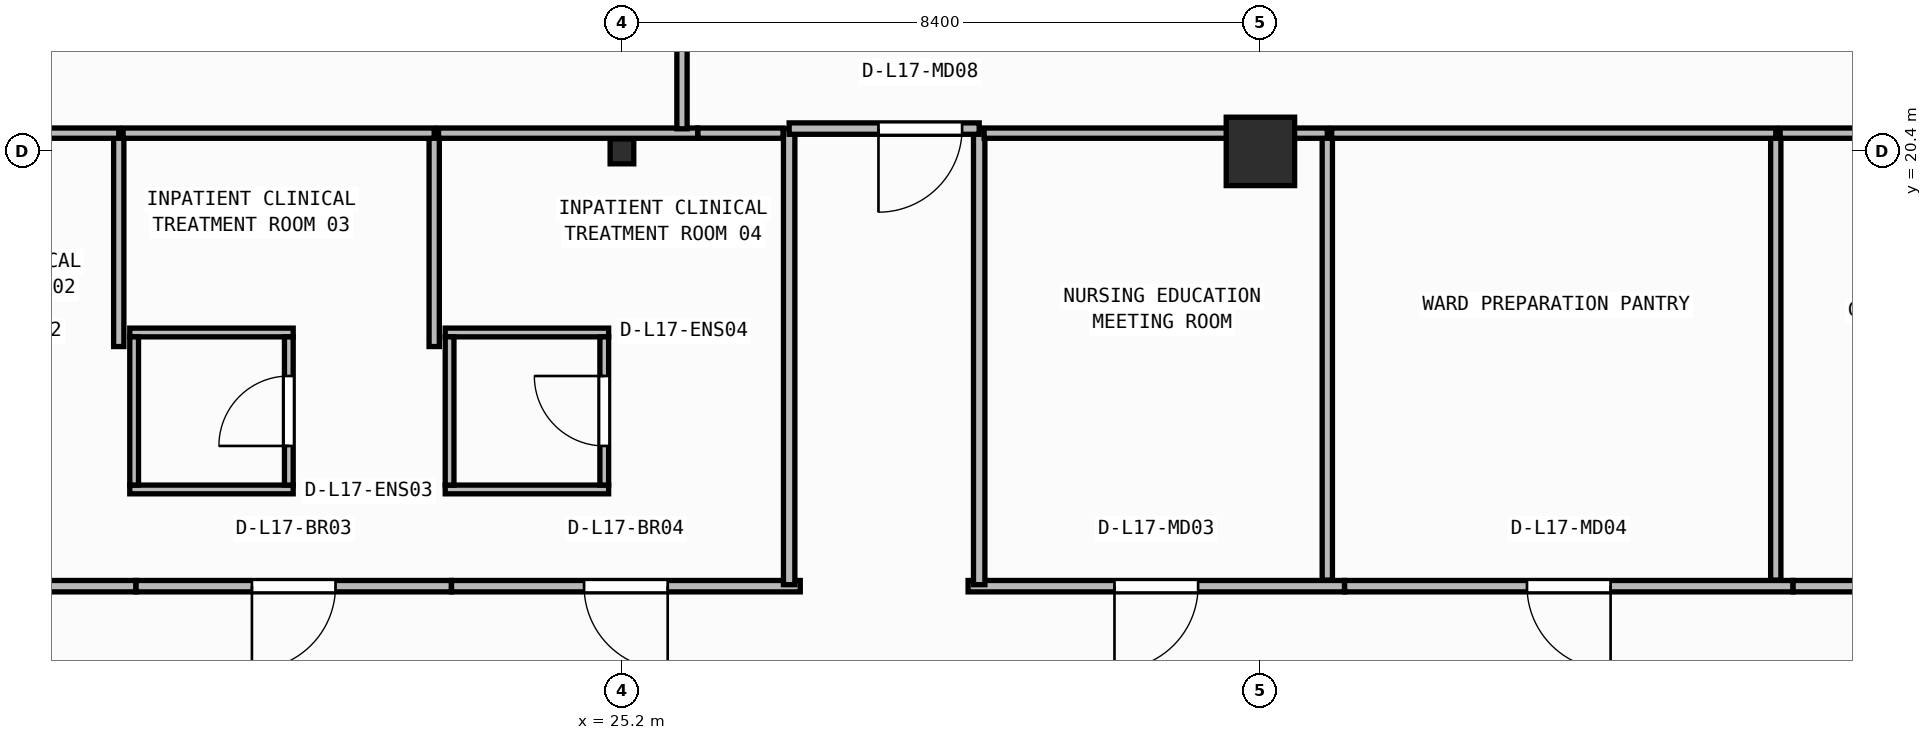
"""IFC4 building model, lengths in metres.
Left out: names, types, materials, properties, quantities, classifications, styles, units other than length and angle.
Written with IfcOpenShell. Run it as: python <this file> out.ifc"""

import sys

from ifc_helpers import new_model, si_unit, direction, frame, frame_2d, origin, origin_2d, place, context, subcontext, project, spatial, rectangle, i_section, extrude, element, fill, save


model = new_model("IFC4")
c1 = context("Model", 3, precision=1e-05, world=origin(), true_north=direction((0.0, 1.0)))
c2 = subcontext(c1, "Body", "Model", "MODEL_VIEW")
j1 = project(units=[si_unit("LENGTHUNIT", "METRE"), si_unit("PLANEANGLEUNIT", "RADIAN")], contexts=[c1])
p1 = place(None, origin())
s1 = spatial("IfcSite", under=j1, at=p1, CompositionType="ELEMENT")
p2 = place(p1, origin())
s2 = spatial("IfcBuilding", under=s1, at=p2, CompositionType="ELEMENT")
p3 = place(p2, frame((0.0, 0.0, 69.9)))
s3 = spatial("IfcBuildingStorey", under=s2, at=p3, CompositionType="ELEMENT", Elevation=69.9)
p4 = place(p3, frame((25.2, 20.4, 0.0), z_axis=(0.0, 0.0, 1.0), x_axis=(1.0, 0.0, 0.0)))
e1 = element("IfcColumn", 1, at=p4, inside=s3, PredefinedType="COLUMN", context=c2, shape_type="SweptSolid", body=[
    extrude(i_section(OverallWidth=0.311, OverallDepth=0.327, WebThickness=0.016, FlangeThickness=0.025, FilletRadius=0.017, at=origin_2d()), origin(), (0.0, 0.0, 1.0), 3.95),
])
p5 = place(p3, frame((33.6, 20.4, 0.0), z_axis=(0.0, 0.0, 1.0), x_axis=(1.0, 0.0, 0.0)))
e2 = element("IfcColumn", 2, at=p5, inside=s3, PredefinedType="COLUMN", context=c2, shape_type="SweptSolid", body=[
    extrude(rectangle(XDim=0.9, YDim=0.9, at=origin_2d()), origin(), (0.0, 0.0, 1.0), 3.95),
])
for number, where, z_axis, x_axis in (
    (3, (18.725, 15.952, 0.0), (0.0, 0.0, 1.0), (1.0, 0.0, 0.0)),
    (4, (18.725, 18.018, 0.0), (0.0, 0.0, 1.0), (1.0, 0.0, 0.0)),
):
    element("IfcWall", number, at=place(p3, frame(where, z_axis=z_axis, x_axis=x_axis)), inside=s3, PredefinedType="PARTITIONING", context=c2, shape_type="SweptSolid", body=[
        extrude(rectangle(XDim=2.15, YDim=0.115, at=frame_2d((1.075, 0.0))), origin(), (0.0, 0.0, 1.0), 3.71),
    ])
p6 = place(p3, frame((18.782, 16.01, 0.0), z_axis=(0.0, 0.0, 1.0), x_axis=(0.0, 1.0, 0.0)))
e5 = element("IfcWall", 5, at=p6, inside=s3, PredefinedType="PARTITIONING", context=c2, shape_type="SweptSolid", body=[
    extrude(rectangle(XDim=1.95, YDim=0.115, at=frame_2d((0.975, 0.0))), origin(), (0.0, 0.0, 1.0), 3.71),
])
p7 = place(p3, frame((20.817, 16.01, 0.0), z_axis=(0.0, 0.0, 1.0), x_axis=(0.0, 1.0, 0.0)))
e6 = element("IfcWall", 6, at=p7, inside=s3, PredefinedType="PARTITIONING", context=c2, shape_type="SweptSolid", body=[
    extrude(rectangle(XDim=1.95, YDim=0.115, at=frame_2d((0.975, 0.0))), origin(), (0.0, 0.0, 1.0), 3.71),
])
p8 = place(p7, frame((0.515, 0.0, 0.0)))
e7 = element("IfcOpeningElement", 7, at=p8, cuts=e6, PredefinedType="OPENING", context=c2, shape_type="SweptSolid", body=[
    extrude(rectangle(XDim=0.92, YDim=2.1, at=frame_2d((0.46, 1.05))), frame((0.0, 0.067, 0.0), z_axis=(0.0, -1.0, 0.0), x_axis=(1.0, 0.0, 0.0)), (0.0, 0.0, 1.0), 0.135),
])
for number, where, z_axis, x_axis in (
    (8, (22.875, 15.952, 0.0), (0.0, 0.0, 1.0), (1.0, 0.0, 0.0)),
    (9, (22.875, 18.018, 0.0), (0.0, 0.0, 1.0), (1.0, 0.0, 0.0)),
):
    element("IfcWall", number, at=place(p3, frame(where, z_axis=z_axis, x_axis=x_axis)), inside=s3, PredefinedType="PARTITIONING", context=c2, shape_type="SweptSolid", body=[
        extrude(rectangle(XDim=2.15, YDim=0.115, at=frame_2d((1.075, 0.0))), origin(), (0.0, 0.0, 1.0), 3.71),
    ])
p9 = place(p3, frame((22.933, 16.01, 0.0), z_axis=(0.0, 0.0, 1.0), x_axis=(0.0, 1.0, 0.0)))
e10 = element("IfcWall", 10, at=p9, inside=s3, PredefinedType="PARTITIONING", context=c2, shape_type="SweptSolid", body=[
    extrude(rectangle(XDim=1.95, YDim=0.115, at=frame_2d((0.975, 0.0))), origin(), (0.0, 0.0, 1.0), 3.71),
])
p10 = place(p3, frame((24.968, 16.01, 0.0), z_axis=(0.0, 0.0, 1.0), x_axis=(0.0, 1.0, 0.0)))
e11 = element("IfcWall", 11, at=p10, inside=s3, PredefinedType="PARTITIONING", context=c2, shape_type="SweptSolid", body=[
    extrude(rectangle(XDim=1.95, YDim=0.115, at=frame_2d((0.975, 0.0))), origin(), (0.0, 0.0, 1.0), 3.073),
])
p11 = place(p10, frame((0.515, 0.0, 0.0)))
e12 = element("IfcOpeningElement", 12, at=p11, cuts=e11, PredefinedType="OPENING", context=c2, shape_type="SweptSolid", body=[
    extrude(rectangle(XDim=0.92, YDim=2.1, at=frame_2d((0.46, 1.05))), frame((0.0, 0.067, 0.0), z_axis=(0.0, -1.0, 0.0), x_axis=(1.0, 0.0, 0.0)), (0.0, 0.0, 1.0), 0.135),
])
p12 = place(p3, frame((18.806, 14.68, 0.0), z_axis=(0.0, 0.0, 1.0), x_axis=(-1.0, 0.0, 0.0)))
e13 = element("IfcWall", 13, at=p12, inside=s3, PredefinedType="PARTITIONING", context=c2, shape_type="SweptSolid", body=[
    extrude(rectangle(XDim=4.868, YDim=0.15, at=frame_2d((2.434, 0.0))), origin(), (0.0, 0.0, 1.0), 3.71),
])
p13 = place(p12, frame((1.884, 0.0, 0.0)))
e14 = element("IfcOpeningElement", 14, at=p13, cuts=e13, PredefinedType="OPENING", context=c2, shape_type="SweptSolid", body=[
    extrude(rectangle(XDim=1.1, YDim=2.1, at=frame_2d((0.55, 1.05))), frame((0.0, 0.085, 0.0), z_axis=(0.0, -1.0, 0.0), x_axis=(1.0, 0.0, 0.0)), (0.0, 0.0, 1.0), 0.17),
])
p14 = place(p3, frame((22.956, 14.68, 0.0), z_axis=(0.0, 0.0, 1.0), x_axis=(-1.0, 0.0, 0.0)))
e15 = element("IfcWall", 15, at=p14, inside=s3, PredefinedType="PARTITIONING", context=c2, shape_type="SweptSolid", body=[
    extrude(rectangle(XDim=4.148, YDim=0.15, at=frame_2d((2.074, 0.0))), origin(), (0.0, 0.0, 1.0), 3.71),
])
p15 = place(p14, frame((1.524, 0.0, 0.0)))
e16 = element("IfcOpeningElement", 16, at=p15, cuts=e15, PredefinedType="OPENING", context=c2, shape_type="SweptSolid", body=[
    extrude(rectangle(XDim=1.1, YDim=2.1, at=frame_2d((0.55, 1.05))), frame((0.0, 0.085, 0.0), z_axis=(0.0, -1.0, 0.0), x_axis=(1.0, 0.0, 0.0)), (0.0, 0.0, 1.0), 0.17),
])
p16 = place(p3, frame((27.546, 14.68, 0.0), z_axis=(0.0, 0.0, 1.0), x_axis=(-1.0, 0.0, 0.0)))
e17 = element("IfcWall", 17, at=p16, inside=s3, PredefinedType="PARTITIONING", context=c2, shape_type="SweptSolid", body=[
    extrude(rectangle(XDim=4.588, YDim=0.15, at=frame_2d((2.294, 0.0))), origin(), (0.0, 0.0, 1.0), 3.71),
])
p17 = place(p16, frame((1.744, 0.0, 0.0)))
e18 = element("IfcOpeningElement", 18, at=p17, cuts=e17, PredefinedType="OPENING", context=c2, shape_type="SweptSolid", body=[
    extrude(rectangle(XDim=1.1, YDim=2.1, at=frame_2d((0.55, 1.05))), frame((0.0, 0.085, 0.0), z_axis=(0.0, -1.0, 0.0), x_axis=(1.0, 0.0, 0.0)), (0.0, 0.0, 1.0), 0.17),
])
p18 = place(p3, frame((34.706, 14.68, 0.0), z_axis=(0.0, 0.0, 1.0), x_axis=(-1.0, 0.0, 0.0)))
e19 = element("IfcWall", 19, at=p18, inside=s3, PredefinedType="PARTITIONING", context=c2, shape_type="SweptSolid", body=[
    extrude(rectangle(XDim=4.952, YDim=0.15, at=frame_2d((2.476, 0.0))), origin(), (0.0, 0.0, 1.0), 3.71),
])
p19 = place(p18, frame((1.926, 0.0, 0.0)))
e20 = element("IfcOpeningElement", 20, at=p19, cuts=e19, PredefinedType="OPENING", context=c2, shape_type="SweptSolid", body=[
    extrude(rectangle(XDim=1.1, YDim=2.1, at=frame_2d((0.55, 1.05))), frame((0.0, 0.085, 0.0), z_axis=(0.0, -1.0, 0.0), x_axis=(1.0, 0.0, 0.0)), (0.0, 0.0, 1.0), 0.17),
])
p20 = place(p3, frame((40.606, 14.68, 0.0), z_axis=(0.0, 0.0, 1.0), x_axis=(-1.0, 0.0, 0.0)))
e21 = element("IfcWall", 21, at=p20, inside=s3, PredefinedType="PARTITIONING", context=c2, shape_type="SweptSolid", body=[
    extrude(rectangle(XDim=5.898, YDim=0.15, at=frame_2d((2.949, 0.0))), origin(), (0.0, 0.0, 1.0), 3.71),
])
p21 = place(p20, frame((2.399, 0.0, 0.0)))
e22 = element("IfcOpeningElement", 22, at=p21, cuts=e21, PredefinedType="OPENING", context=c2, shape_type="SweptSolid", body=[
    extrude(rectangle(XDim=1.1, YDim=2.1, at=frame_2d((0.55, 1.05))), frame((0.0, 0.085, 0.0), z_axis=(0.0, -1.0, 0.0), x_axis=(1.0, 0.0, 0.0)), (0.0, 0.0, 1.0), 0.17),
])
p22 = place(p3, frame((48.696, 14.68, 0.0), z_axis=(0.0, 0.0, 1.0), x_axis=(-1.0, 0.0, 0.0)))
e23 = element("IfcWall", 23, at=p22, inside=s3, PredefinedType="PARTITIONING", context=c2, shape_type="SweptSolid", body=[
    extrude(rectangle(XDim=8.088, YDim=0.15, at=frame_2d((4.044, 0.0))), origin(), (0.0, 0.0, 1.0), 3.71),
])
p23 = place(p22, frame((3.494, 0.0, 0.0)))
e24 = element("IfcOpeningElement", 24, at=p23, cuts=e23, PredefinedType="OPENING", context=c2, shape_type="SweptSolid", body=[
    extrude(rectangle(XDim=1.1, YDim=2.1, at=frame_2d((0.55, 1.05))), frame((0.0, 0.085, 0.0), z_axis=(0.0, -1.0, 0.0), x_axis=(1.0, 0.0, 0.0)), (0.0, 0.0, 1.0), 0.17),
])
for number, where, z_axis, x_axis in (
    (25, (27.4, 20.7, 0.0), (0.0, 0.0, 1.0), (0.0, -1.0, 0.0)),
    (26, (29.9, 14.7, 0.0), (0.0, 0.0, 1.0), (0.0, 1.0, 0.0)),
):
    element("IfcWall", number, at=place(p3, frame(where, z_axis=z_axis, x_axis=x_axis)), inside=s3, PredefinedType="PARTITIONING", context=c2, shape_type="SweptSolid", body=[
        extrude(rectangle(XDim=6.0, YDim=0.15, at=frame_2d((3.0, 0.0))), origin(), (0.0, 0.0, 1.0), 3.71),
    ])
p24 = place(p3, frame((29.9, 20.7, 0.0), z_axis=(0.0, 0.0, 1.0), x_axis=(-1.0, 0.0, 0.0)))
e27 = element("IfcWall", 27, at=p24, inside=s3, PredefinedType="PARTITIONING", context=c2, shape_type="SweptSolid", body=[
    extrude(rectangle(XDim=2.5, YDim=0.15, at=frame_2d((1.25, 0.0))), origin(), (0.0, 0.0, 1.0), 3.073),
])
p25 = place(p24, frame((0.225, 0.0, 0.0)))
e28 = element("IfcOpeningElement", 28, at=p25, cuts=e27, PredefinedType="OPENING", context=c2, shape_type="SweptSolid", body=[
    extrude(rectangle(XDim=1.1, YDim=2.1, at=frame_2d((0.55, 1.05))), frame((0.0, 0.085, 0.0), z_axis=(0.0, -1.0, 0.0), x_axis=(1.0, 0.0, 0.0)), (0.0, 0.0, 1.0), 0.17),
])
p26 = place(p3, frame((18.58, 17.833, 0.0), z_axis=(0.0, 0.0, 1.0), x_axis=(0.0, 1.0, 0.0)))
e29 = element("IfcWall", 29, at=p26, inside=s3, PredefinedType="PARTITIONING", context=c2, shape_type="SweptSolid", body=[
    extrude(rectangle(XDim=2.807, YDim=0.135, at=frame_2d((1.404, 0.0))), origin(), (0.0, 0.0, 1.0), 3.71),
])
p27 = place(p3, frame((18.58, 20.64, 0.0), z_axis=(0.0, 0.0, 1.0), x_axis=(-1.0, 0.0, 0.0)))
e30 = element("IfcWall", 30, at=p27, inside=s3, PredefinedType="PARTITIONING", context=c2, shape_type="SweptSolid", body=[
    extrude(rectangle(XDim=4.812, YDim=0.135, at=frame_2d((2.406, 0.0))), origin(), (0.0, 0.0, 1.0), 3.073),
])
p28 = place(p3, frame((22.73, 17.833, 0.0), z_axis=(0.0, 0.0, 1.0), x_axis=(0.0, 1.0, 0.0)))
e31 = element("IfcWall", 31, at=p28, inside=s3, PredefinedType="PARTITIONING", context=c2, shape_type="SweptSolid", body=[
    extrude(rectangle(XDim=2.807, YDim=0.135, at=frame_2d((1.404, 0.0))), origin(), (0.0, 0.0, 1.0), 3.71),
])
p29 = place(p3, frame((22.73, 20.64, 0.0), z_axis=(0.0, 0.0, 1.0), x_axis=(-1.0, 0.0, 0.0)))
e32 = element("IfcWall", 32, at=p29, inside=s3, PredefinedType="PARTITIONING", context=c2, shape_type="SweptSolid", body=[
    extrude(rectangle(XDim=4.093, YDim=0.135, at=frame_2d((2.046, 0.0))), origin(), (0.0, 0.0, 1.0), 3.073),
])
p30 = place(p3, frame((26.198, 20.64, 0.0), z_axis=(0.0, 0.0, 1.0), x_axis=(-1.0, 0.0, 0.0)))
e33 = element("IfcWall", 33, at=p30, inside=s3, PredefinedType="PARTITIONING", context=c2, shape_type="SweptSolid", body=[
    extrude(rectangle(XDim=3.41, YDim=0.135, at=frame_2d((1.705, 0.0))), origin(), (0.0, 0.0, 1.0), 3.073),
])
p31 = place(p3, frame((27.32, 20.64, 0.0), z_axis=(0.0, 0.0, 1.0), x_axis=(-1.0, 0.0, 0.0)))
e34 = element("IfcWall", 34, at=p31, inside=s3, PredefinedType="PARTITIONING", context=c2, shape_type="SweptSolid", body=[
    extrude(rectangle(XDim=1.121, YDim=0.135, at=frame_2d((0.56, 0.0))), origin(), (0.0, 0.0, 1.0), 3.073),
])
p32 = place(p3, frame((34.48, 14.76, 0.0), z_axis=(0.0, 0.0, 1.0), x_axis=(0.0, 1.0, 0.0)))
e35 = element("IfcWall", 35, at=p32, inside=s3, PredefinedType="PARTITIONING", context=c2, shape_type="SweptSolid", body=[
    extrude(rectangle(XDim=5.88, YDim=0.135, at=frame_2d((2.94, 0.0))), origin(), (0.0, 0.0, 1.0), 3.71),
])
p33 = place(p3, frame((34.48, 20.64, 0.0), z_axis=(0.0, 0.0, 1.0), x_axis=(-1.0, 0.0, 0.0)))
e36 = element("IfcWall", 36, at=p33, inside=s3, PredefinedType="PARTITIONING", context=c2, shape_type="SweptSolid", body=[
    extrude(rectangle(XDim=4.515, YDim=0.135, at=frame_2d((2.257, 0.0))), origin(), (0.0, 0.0, 1.0), 3.073),
])
p34 = place(p3, frame((40.38, 14.76, 0.0), z_axis=(0.0, 0.0, 1.0), x_axis=(0.0, 1.0, 0.0)))
e37 = element("IfcWall", 37, at=p34, inside=s3, PredefinedType="PARTITIONING", context=c2, shape_type="SweptSolid", body=[
    extrude(rectangle(XDim=5.88, YDim=0.135, at=frame_2d((2.94, 0.0))), origin(), (0.0, 0.0, 1.0), 3.71),
])
p35 = place(p3, frame((40.38, 20.64, 0.0), z_axis=(0.0, 0.0, 1.0), x_axis=(-1.0, 0.0, 0.0)))
e38 = element("IfcWall", 38, at=p35, inside=s3, PredefinedType="PARTITIONING", context=c2, shape_type="SweptSolid", body=[
    extrude(rectangle(XDim=5.842, YDim=0.135, at=frame_2d((2.921, 0.0))), origin(), (0.0, 0.0, 1.0), 3.073),
])
p36 = place(p3, frame((42.688, 20.64, 0.0), z_axis=(0.0, 0.0, 1.0), x_axis=(-1.0, 0.0, 0.0)))
e39 = element("IfcWall", 39, at=p36, inside=s3, PredefinedType="PARTITIONING", context=c2, shape_type="SweptSolid", body=[
    extrude(rectangle(XDim=2.25, YDim=0.135, at=frame_2d((1.125, 0.0))), origin(), (0.0, 0.0, 1.0), 3.073),
])
p37 = place(p3, frame((25.99, 20.698, 0.0), z_axis=(0.0, 0.0, 1.0), x_axis=(0.0, 1.0, 0.0)))
e40 = element("IfcWall", 40, at=p37, inside=s3, PredefinedType="PARTITIONING", context=c2, shape_type="SweptSolid", body=[
    extrude(rectangle(XDim=10.779, YDim=0.135, at=frame_2d((5.39, 0.0))), origin(), (0.0, 0.0, 1.0), 3.71),
])
p38 = place(p8, origin())
e41 = element("IfcDoor", 41, at=p38, inside=s3, OperationType="SINGLE_SWING_LEFT", PredefinedType="DOOR", context=c2, shape_type="SweptSolid", body=[
    extrude(rectangle(XDim=0.92, YDim=2.1, at=frame_2d((0.46, 1.05))), frame((0.0, 0.025, 0.0), z_axis=(0.0, -1.0, 0.0), x_axis=(1.0, 0.0, 0.0)), (0.0, 0.0, 1.0), 0.05),
])
fill(e7, e41)
p39 = place(p11, origin())
e42 = element("IfcDoor", 42, at=p39, inside=s3, OperationType="SINGLE_SWING_RIGHT", PredefinedType="DOOR", context=c2, shape_type="SweptSolid", body=[
    extrude(rectangle(XDim=0.92, YDim=2.1, at=frame_2d((0.46, 1.05))), frame((0.0, 0.025, 0.0), z_axis=(0.0, -1.0, 0.0), x_axis=(1.0, 0.0, 0.0)), (0.0, 0.0, 1.0), 0.05),
])
fill(e12, e42)
p40 = place(p15, origin())
e43 = element("IfcDoor", 43, at=p40, inside=s3, OperationType="SINGLE_SWING_RIGHT", PredefinedType="DOOR", context=c2, shape_type="SweptSolid", body=[
    extrude(rectangle(XDim=1.1, YDim=2.1, at=frame_2d((0.55, 1.05))), frame((0.0, 0.025, 0.0), z_axis=(0.0, -1.0, 0.0), x_axis=(1.0, 0.0, 0.0)), (0.0, 0.0, 1.0), 0.05),
])
fill(e16, e43)
p41 = place(p17, origin())
e44 = element("IfcDoor", 44, at=p41, inside=s3, OperationType="SINGLE_SWING_LEFT", PredefinedType="DOOR", context=c2, shape_type="SweptSolid", body=[
    extrude(rectangle(XDim=1.1, YDim=2.1, at=frame_2d((0.55, 1.05))), frame((0.0, 0.025, 0.0), z_axis=(0.0, -1.0, 0.0), x_axis=(1.0, 0.0, 0.0)), (0.0, 0.0, 1.0), 0.05),
])
fill(e18, e44)
p42 = place(p19, origin())
e45 = element("IfcDoor", 45, at=p42, inside=s3, OperationType="SINGLE_SWING_RIGHT", PredefinedType="DOOR", context=c2, shape_type="SweptSolid", body=[
    extrude(rectangle(XDim=1.1, YDim=2.1, at=frame_2d((0.55, 1.05))), frame((0.0, 0.025, 0.0), z_axis=(0.0, -1.0, 0.0), x_axis=(1.0, 0.0, 0.0)), (0.0, 0.0, 1.0), 0.05),
])
fill(e20, e45)
p43 = place(p21, origin())
e46 = element("IfcDoor", 46, at=p43, inside=s3, OperationType="SINGLE_SWING_LEFT", PredefinedType="DOOR", context=c2, shape_type="SweptSolid", body=[
    extrude(rectangle(XDim=1.1, YDim=2.1, at=frame_2d((0.55, 1.05))), frame((0.0, 0.025, 0.0), z_axis=(0.0, -1.0, 0.0), x_axis=(1.0, 0.0, 0.0)), (0.0, 0.0, 1.0), 0.05),
])
fill(e22, e46)
p44 = place(p25, origin())
e47 = element("IfcDoor", 47, at=p44, inside=s3, OperationType="SINGLE_SWING_RIGHT", PredefinedType="DOOR", context=c2, shape_type="SweptSolid", body=[
    extrude(rectangle(XDim=1.1, YDim=2.1, at=frame_2d((0.55, 1.05))), frame((0.0, 0.025, 0.0), z_axis=(0.0, -1.0, 0.0), x_axis=(1.0, 0.0, 0.0)), (0.0, 0.0, 1.0), 0.05),
])
fill(e28, e47)
save(model, sys.argv[1])
